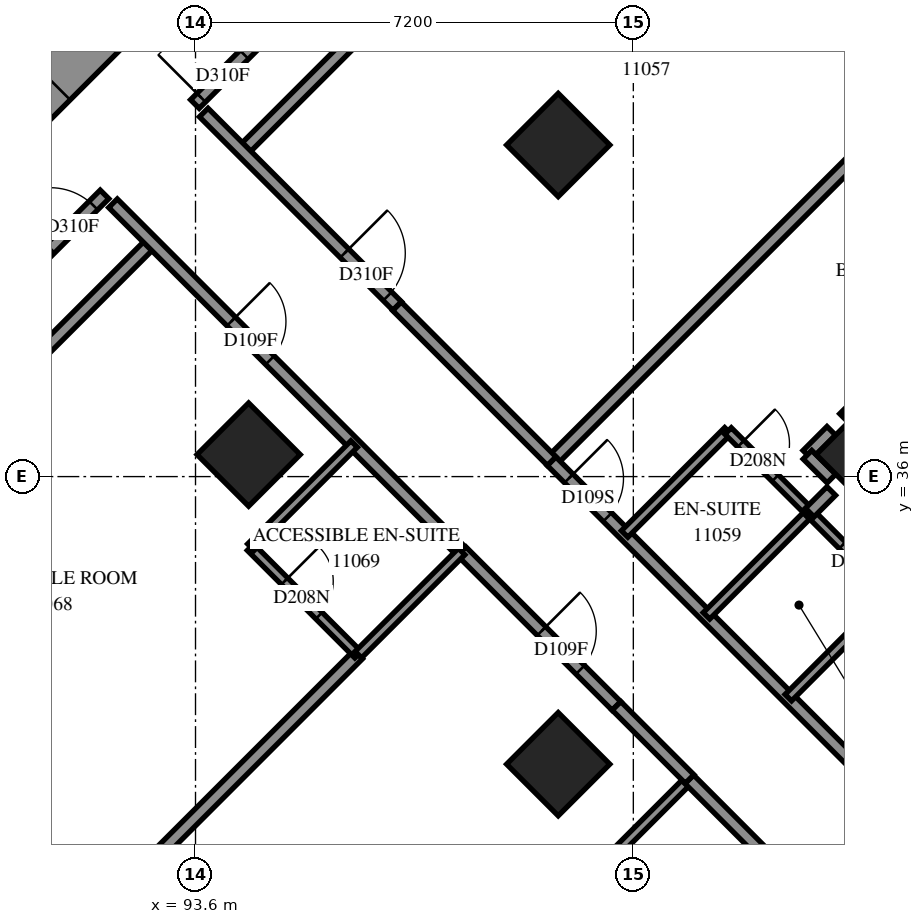
"""IFC4 building model, lengths in metres.
Left out: names, types, materials, properties, quantities, classifications, styles, units other than length and angle.
Written with IfcOpenShell. Run it as: python <this file> out.ifc"""

import sys

from ifc_helpers import new_model, si_unit, direction, frame, frame_2d, origin, origin_2d, place, context, subcontext, project, spatial, polyline, rectangle, outline, extrude, element, fill, save


model = new_model("IFC4")
c1 = context("Model", 3, precision=1e-05, world=origin(), true_north=direction((0.0, 1.0)))
c2 = subcontext(c1, "Body", "Model", "MODEL_VIEW")
j1 = project(units=[si_unit("LENGTHUNIT", "METRE"), si_unit("PLANEANGLEUNIT", "RADIAN")], contexts=[c1])
p1 = place(None, origin())
s1 = spatial("IfcSite", under=j1, at=p1, CompositionType="ELEMENT")
p2 = place(p1, origin())
s2 = spatial("IfcBuilding", under=s1, at=p2, CompositionType="ELEMENT")
p3 = place(p2, frame((0.0, 0.0, 44.0)))
s3 = spatial("IfcBuildingStorey", under=s2, at=p3, CompositionType="ELEMENT", Elevation=44.0)
for number, where, z_axis, x_axis in (
    (1, (99.565, 41.453, 0.0), (0.0, 0.0, 1.0), (0.707, -0.707, 0.0)),
    (2, (94.474, 36.362, 0.0), (0.0, 0.0, 1.0), (0.707, -0.707, 0.0)),
    (3, (104.656, 36.362, 0.0), (0.0, 0.0, 1.0), (0.707, -0.707, 0.0)),
    (4, (99.565, 31.271, 0.0), (0.0, 0.0, 1.0), (0.707, -0.707, 0.0)),
):
    element("IfcColumn", number, at=place(p3, frame(where, z_axis=z_axis, x_axis=x_axis)), inside=s3, PredefinedType="COLUMN", context=c2, shape_type="SweptSolid", body=[
        extrude(rectangle(XDim=1.2, YDim=1.2, at=origin_2d()), origin(), (0.0, 0.0, 1.0), 3.1),
    ])
p4 = place(p3, frame((87.19, 38.554, -0.3), z_axis=(0.0, 0.0, 1.0), x_axis=(0.707103309, 0.7071102534, 0.0)))
e5 = element("IfcWall", 5, at=p4, inside=s3, PredefinedType="SHEAR", context=c2, shape_type="SweptSolid", body=[
    extrude(rectangle(XDim=14.4, YDim=1.0, at=frame_2d((7.2, 0.0))), origin(), (0.0, 0.0, 1.0), 2.7),
])
p5 = place(p4, frame((4.55, 0.0, 0.3)))
e6 = element("IfcOpeningElement", 6, at=p5, cuts=e5, PredefinedType="OPENING", context=c2, shape_type="SweptSolid", body=[
    extrude(rectangle(XDim=1.1, YDim=2.1, at=frame_2d((0.55, 1.05))), frame((0.0, 0.51, 0.0), z_axis=(0.0, -1.0, 0.0), x_axis=(1.0, 0.0, 0.0)), (0.0, 0.0, 1.0), 1.02),
])
p6 = place(p4, frame((11.35, 0.0, 0.3)))
e7 = element("IfcOpeningElement", 7, at=p6, cuts=e5, PredefinedType="OPENING", context=c2, shape_type="SweptSolid", body=[
    extrude(rectangle(XDim=1.1, YDim=2.1, at=frame_2d((0.55, 1.05))), frame((0.0, 0.51, 0.0), z_axis=(0.0, -1.0, 0.0), x_axis=(1.0, 0.0, 0.0)), (0.0, 0.0, 1.0), 1.02),
])
p7 = place(p3, frame((88.097, 30.612, 0.0), z_axis=(0.0, 0.0, 1.0), x_axis=(0.7841326465, -0.6205932587, 0.0)))
e8 = element("IfcWall", 8, at=p7, inside=s3, PredefinedType="SOLIDWALL", context=c2, shape_type="SweptSolid", body=[
    extrude(outline(polyline([(-0.032, -0.275), (3.868, -0.275), (3.932, 0.275), (0.032, 0.275), (-0.032, -0.275)])), origin(), (0.0, 0.0, 1.0), 3.1),
])
p8 = place(p7, frame((0.673, 0.0, 0.5)))
e9 = element("IfcOpeningElement", 9, at=p8, cuts=e8, PredefinedType="OPENING", context=c2, shape_type="SweptSolid", body=[
    extrude(rectangle(XDim=2.8, YDim=2.45, at=frame_2d((1.4, 1.225))), frame((0.0, 0.285, 0.0), z_axis=(0.0, -1.0, 0.0), x_axis=(1.0, 0.0, 0.0)), (0.0, 0.0, 1.0), 0.57),
])
p9 = place(p3, frame((99.459, 36.255, 0.0), z_axis=(0.0, 0.0, 1.0), x_axis=(0.7071903932, 0.7070231593, 0.0)))
e10 = element("IfcWall", 10, at=p9, inside=s3, PredefinedType="PARTITIONING", context=c2, shape_type="SweptSolid", body=[
    extrude(rectangle(XDim=11.959, YDim=0.2, at=frame_2d((5.98, 0.0))), origin(), (0.0, 0.0, 1.0), 3.1),
])
p10 = place(p3, frame((94.367, 41.349, 0.0), z_axis=(0.0, 0.0, 1.0), x_axis=(0.7071109781, 0.7071025843, 0.0)))
e11 = element("IfcWall", 11, at=p10, inside=s3, PredefinedType="PARTITIONING", context=c2, shape_type="SweptSolid", body=[
    extrude(rectangle(XDim=11.914, YDim=0.2, at=frame_2d((5.957, 0.0))), origin(), (0.0, 0.0, 1.0), 3.1),
])
p11 = place(p3, frame((93.59, 42.126, 0.0), z_axis=(0.0, 0.0, 1.0), x_axis=(0.7071067812, 0.7071067812, 0.0)))
e12 = element("IfcWall", 12, at=p11, inside=s3, PredefinedType="PARTITIONING", context=c2, shape_type="SweptSolid", body=[
    extrude(rectangle(XDim=9.849, YDim=0.2, at=frame_2d((4.924, 0.0))), origin(), (0.0, 0.0, 1.0), 3.1),
])
p12 = place(p11, frame((0.148, 0.0, 0.0)))
e13 = element("IfcOpeningElement", 13, at=p12, cuts=e12, PredefinedType="OPENING", context=c2, shape_type="SweptSolid", body=[
    extrude(rectangle(XDim=1.0, YDim=2.1, at=frame_2d((0.5, 1.05))), frame((0.0, 0.11, 0.0), z_axis=(0.0, -1.0, 0.0), x_axis=(1.0, 0.0, 0.0)), (0.0, 0.0, 1.0), 0.22),
])
p13 = place(p3, frame((86.324, 33.296, 0.0), z_axis=(0.0, 0.0, 1.0), x_axis=(0.7069990152, 0.7072145308, 0.0)))
e14 = element("IfcWall", 14, at=p13, inside=s3, PredefinedType="PARTITIONING", context=c2, shape_type="SweptSolid", body=[
    extrude(rectangle(XDim=9.28, YDim=0.2, at=frame_2d((4.64, 0.0))), origin(), (0.0, 0.0, 1.0), 3.1),
])
p14 = place(p3, frame((92.243, 40.495, 0.0), z_axis=(0.0, 0.0, 1.0), x_axis=(0.7071067812, -0.7071067812, 0.0)))
e15 = element("IfcWall", 15, at=p14, inside=s3, PredefinedType="PARTITIONING", context=c2, shape_type="SweptSolid", body=[
    extrude(rectangle(XDim=8.101, YDim=0.2, at=frame_2d((4.05, 0.0))), origin(), (0.0, 0.0, 1.0), 3.1),
])
p15 = place(p14, frame((2.75, 0.0, 0.0)))
e16 = element("IfcOpeningElement", 16, at=p15, cuts=e15, PredefinedType="OPENING", context=c2, shape_type="SweptSolid", body=[
    extrude(rectangle(XDim=0.9, YDim=2.1, at=frame_2d((0.45, 1.05))), frame((0.0, 0.11, 0.0), z_axis=(0.0, -1.0, 0.0), x_axis=(1.0, 0.0, 0.0)), (0.0, 0.0, 1.0), 0.22),
])
p16 = place(p3, frame((86.836, 35.372, 0.0), z_axis=(0.0, 0.0, 1.0), x_axis=(0.7071067812, 0.7071067812, 0.0)))
e17 = element("IfcWall", 17, at=p16, inside=s3, PredefinedType="PARTITIONING", context=c2, shape_type="SweptSolid", body=[
    extrude(rectangle(XDim=7.45, YDim=0.2, at=frame_2d((3.725, 0.0))), origin(), (0.0, 0.0, 1.0), 3.1),
])
p17 = place(p16, frame((6.192, 0.0, 0.0)))
e18 = element("IfcOpeningElement", 18, at=p17, cuts=e17, PredefinedType="OPENING", context=c2, shape_type="SweptSolid", body=[
    extrude(rectangle(XDim=1.0, YDim=2.1, at=frame_2d((0.5, 1.05))), frame((0.0, 0.11, 0.0), z_axis=(0.0, -1.0, 0.0), x_axis=(1.0, 0.0, 0.0)), (0.0, 0.0, 1.0), 0.22),
])
p18 = place(p3, frame((99.455, 36.253, 0.0), z_axis=(0.0, 0.0, 1.0), x_axis=(0.7071067812, -0.7071067812, 0.0)))
e19 = element("IfcWall", 19, at=p18, inside=s3, PredefinedType="PARTITIONING", context=c2, shape_type="SweptSolid", body=[
    extrude(rectangle(XDim=7.201, YDim=0.2, at=frame_2d((3.601, 0.0))), origin(), (0.0, 0.0, 1.0), 3.1),
])
p19 = place(p18, frame((0.401, 0.0, 0.0)))
e20 = element("IfcOpeningElement", 20, at=p19, cuts=e19, PredefinedType="OPENING", context=c2, shape_type="SweptSolid", body=[
    extrude(rectangle(XDim=0.9, YDim=2.1, at=frame_2d((0.45, 1.05))), frame((0.0, 0.11, 0.0), z_axis=(0.0, -1.0, 0.0), x_axis=(1.0, 0.0, 0.0)), (0.0, 0.0, 1.0), 0.22),
])
p20 = place(p3, frame((91.456, 28.255, 0.0), z_axis=(0.0, 0.0, 1.0), x_axis=(0.7071067812, 0.7071067812, 0.0)))
e21 = element("IfcWall", 21, at=p20, inside=s3, PredefinedType="PARTITIONING", context=c2, shape_type="SweptSolid", body=[
    extrude(rectangle(XDim=6.816, YDim=0.2, at=frame_2d((3.408, 0.0))), origin(), (0.0, 0.0, 1.0), 3.1),
])
p21 = place(p3, frame((93.735, 41.987, 0.0), z_axis=(0.0, 0.0, 1.0), x_axis=(0.7071067812, -0.7071067812, 0.0)))
e22 = element("IfcWall", 22, at=p21, inside=s3, PredefinedType="PARTITIONING", context=c2, shape_type="SweptSolid", body=[
    extrude(rectangle(XDim=4.5, YDim=0.2, at=frame_2d((2.25, 0.0))), origin(), (0.0, 0.0, 1.0), 3.1),
])
p22 = place(p21, frame((3.274, 0.0, 0.0)))
e23 = element("IfcOpeningElement", 23, at=p22, cuts=e22, PredefinedType="OPENING", context=c2, shape_type="SweptSolid", body=[
    extrude(rectangle(XDim=1.0, YDim=2.1, at=frame_2d((0.5, 1.05))), frame((0.0, 0.11, 0.0), z_axis=(0.0, -1.0, 0.0), x_axis=(1.0, 0.0, 0.0)), (0.0, 0.0, 1.0), 0.22),
])
p23 = place(p3, frame((96.913, 38.801, 0.0), z_axis=(0.0, 0.0, 1.0), x_axis=(0.7068288851, -0.7073845681, 0.0)))
e24 = element("IfcWall", 24, at=p23, inside=s3, PredefinedType="PARTITIONING", context=c2, shape_type="SweptSolid", body=[
    extrude(rectangle(XDim=3.599, YDim=0.2, at=frame_2d((1.8, 0.0))), origin(), (0.0, 0.0, 1.0), 3.1),
])
p24 = place(p3, frame((97.976, 34.772, 0.0), z_axis=(0.0, 0.0, 1.0), x_axis=(0.7073845681, -0.7068288851, 0.0)))
e25 = element("IfcWall", 25, at=p24, inside=s3, PredefinedType="PARTITIONING", context=c2, shape_type="SweptSolid", body=[
    extrude(rectangle(XDim=3.599, YDim=0.2, at=frame_2d((1.8, 0.0))), origin(), (0.0, 0.0, 1.0), 3.1),
])
p25 = place(p24, frame((1.858, 0.0, 0.0)))
e26 = element("IfcOpeningElement", 26, at=p25, cuts=e25, PredefinedType="OPENING", context=c2, shape_type="SweptSolid", body=[
    extrude(rectangle(XDim=0.9, YDim=2.1, at=frame_2d((0.45, 1.05))), frame((0.0, 0.11, 0.0), z_axis=(0.0, -1.0, 0.0), x_axis=(1.0, 0.0, 0.0)), (0.0, 0.0, 1.0), 0.22),
])
p26 = place(p3, frame((94.505, 34.839, 0.0), z_axis=(0.0, 0.0, 1.0), x_axis=(0.7071067812, -0.7071067812, 0.0)))
e27 = element("IfcWall", 27, at=p26, inside=s3, PredefinedType="PARTITIONING", context=c2, shape_type="SweptSolid", body=[
    extrude(rectangle(XDim=2.5, YDim=0.15, at=frame_2d((1.25, 0.0))), origin(), (0.0, 0.0, 1.0), 3.1),
])
p27 = place(p26, frame((0.792, 0.0, 0.0)))
e28 = element("IfcOpeningElement", 28, at=p27, cuts=e27, PredefinedType="OPENING", context=c2, shape_type="SweptSolid", body=[
    extrude(rectangle(XDim=0.8, YDim=2.1, at=frame_2d((0.4, 1.05))), frame((0.0, 0.085, 0.0), z_axis=(0.0, -1.0, 0.0), x_axis=(1.0, 0.0, 0.0)), (0.0, 0.0, 1.0), 0.17),
])
for number, where, z_axis, x_axis in (
    (29, (102.003, 33.711, 0.0), (0.0, 0.0, 1.0), (0.707, 0.707, 0.0)),
    (30, (100.023, 29.327, 0.0), (0.0, 0.0, 1.0), (0.707, 0.707, 0.0)),
):
    element("IfcWall", number, at=place(p3, frame(where, z_axis=z_axis, x_axis=x_axis)), inside=s3, PredefinedType="PARTITIONING", context=c2, shape_type="SweptSolid", body=[
        extrude(rectangle(XDim=2.401, YDim=0.15, at=frame_2d((1.201, 0.0))), origin(), (0.0, 0.0, 1.0), 3.1),
    ])
for number, where, z_axis, x_axis in (
    (31, (96.278, 33.072, 0.0), (0.0, 0.0, 1.0), (0.708, 0.707, 0.0)),
    (32, (94.511, 34.839, 0.0), (0.0, 0.0, 1.0), (0.708, 0.707, 0.0)),
    (33, (100.657, 35.057, 0.0), (0.0, 0.0, 1.0), (0.708, 0.707, 0.0)),
    (34, (103.349, 32.365, 0.0), (0.0, 0.0, 1.0), (0.707, 0.708, 0.0)),
):
    element("IfcWall", number, at=place(p3, frame(where, z_axis=z_axis, x_axis=x_axis)), inside=s3, PredefinedType="PARTITIONING", context=c2, shape_type="SweptSolid", body=[
        extrude(rectangle(XDim=2.4, YDim=0.15, at=frame_2d((1.2, 0.0))), origin(), (0.0, 0.0, 1.0), 3.1),
    ])
p28 = place(p3, frame((103.701, 35.407, 0.0), z_axis=(0.0, 0.0, 1.0), x_axis=(0.7065800724, -0.7076330979, 0.0)))
e35 = element("IfcWall", 35, at=p28, inside=s3, PredefinedType="PARTITIONING", context=c2, shape_type="SweptSolid", body=[
    extrude(rectangle(XDim=1.899, YDim=0.15, at=frame_2d((0.95, 0.0))), origin(), (0.0, 0.0, 1.0), 3.1),
])
p29 = place(p28, frame((0.759, 0.0, 0.0)))
e36 = element("IfcOpeningElement", 36, at=p29, cuts=e35, PredefinedType="OPENING", context=c2, shape_type="SweptSolid", body=[
    extrude(rectangle(XDim=0.8, YDim=2.1, at=frame_2d((0.4, 1.05))), frame((0.0, 0.085, 0.0), z_axis=(0.0, -1.0, 0.0), x_axis=(1.0, 0.0, 0.0)), (0.0, 0.0, 1.0), 0.17),
])
p30 = place(p3, frame((101.72, 31.022, 0.0), z_axis=(0.0, 0.0, 1.0), x_axis=(0.7065800724, -0.7076330979, 0.0)))
e37 = element("IfcWall", 37, at=p30, inside=s3, PredefinedType="PARTITIONING", context=c2, shape_type="SweptSolid", body=[
    extrude(rectangle(XDim=1.899, YDim=0.2, at=frame_2d((0.95, 0.0))), origin(), (0.0, 0.0, 1.0), 3.1),
])
p31 = place(p3, frame((102.358, 36.75, 0.0), z_axis=(0.0, 0.0, 1.0), x_axis=(0.7076330979, -0.7065800724, 0.0)))
e38 = element("IfcWall", 38, at=p31, inside=s3, PredefinedType="PARTITIONING", context=c2, shape_type="SweptSolid", body=[
    extrude(rectangle(XDim=1.899, YDim=0.15, at=frame_2d((0.95, 0.0))), origin(), (0.0, 0.0, 1.0), 3.1),
])
p32 = place(p31, frame((0.296, 0.0, 0.0)))
e39 = element("IfcOpeningElement", 39, at=p32, cuts=e38, PredefinedType="OPENING", context=c2, shape_type="SweptSolid", body=[
    extrude(rectangle(XDim=0.8, YDim=2.1, at=frame_2d((0.4, 1.05))), frame((0.0, 0.085, 0.0), z_axis=(0.0, -1.0, 0.0), x_axis=(1.0, 0.0, 0.0)), (0.0, 0.0, 1.0), 0.17),
])
p33 = place(p3, frame((100.523, 32.229, 0.0), z_axis=(0.0, 0.0, 1.0), x_axis=(0.7071067812, -0.7071067812, 0.0)))
e40 = element("IfcWall", 40, at=p33, inside=s3, PredefinedType="PARTITIONING", context=c2, shape_type="SweptSolid", body=[
    extrude(rectangle(XDim=1.7, YDim=0.2, at=frame_2d((0.85, 0.0))), origin(), (0.0, 0.0, 1.0), 3.1),
])
for number, where, z_axis, x_axis in (
    (41, (103.661, 36.359, 0.0), (0.0, 0.0, 1.0), (0.707, 0.707, 0.0)),
    (42, (104.265, 36.963, 0.0), (0.0, 0.0, 1.0), (0.707, 0.707, 0.0)),
):
    element("IfcWall", number, at=place(p3, frame(where, z_axis=z_axis, x_axis=x_axis)), inside=s3, PredefinedType="PARTITIONING", context=c2, shape_type="SweptSolid", body=[
        extrude(rectangle(XDim=0.557, YDim=0.2, at=frame_2d((0.279, 0.0))), origin(), (0.0, 0.0, 1.0), 3.1),
    ])
p34 = place(p3, frame((103.664, 36.36, 0.0), z_axis=(0.0, 0.0, 1.0), x_axis=(0.7089037401, -0.705305244, 0.0)))
e43 = element("IfcWall", 43, at=p34, inside=s3, PredefinedType="PARTITIONING", context=c2, shape_type="SweptSolid", body=[
    extrude(rectangle(XDim=0.556, YDim=0.2, at=frame_2d((0.278, 0.0))), origin(), (0.0, 0.0, 1.0), 3.1),
])
p35 = place(p3, frame((103.701, 35.409, 0.0), z_axis=(0.0, 0.0, 1.0), x_axis=(0.7071067812, 0.7071067812, 0.0)))
e44 = element("IfcWall", 44, at=p35, inside=s3, PredefinedType="PARTITIONING", context=c2, shape_type="SweptSolid", body=[
    extrude(rectangle(XDim=0.501, YDim=0.2, at=frame_2d((0.25, 0.0))), origin(), (0.0, 0.0, 1.0), 3.1),
])
p36 = place(p12, origin())
e45 = element("IfcDoor", 45, at=p36, inside=s3, OperationType="SINGLE_SWING_LEFT", PredefinedType="DOOR", context=c2, shape_type="SweptSolid", body=[
    extrude(rectangle(XDim=1.0, YDim=2.1, at=frame_2d((0.5, 1.05))), frame((0.0, 0.025, 0.0), z_axis=(0.0, -1.0, 0.0), x_axis=(1.0, 0.0, 0.0)), (0.0, 0.0, 1.0), 0.05),
])
fill(e13, e45)
p37 = place(p22, origin())
e46 = element("IfcDoor", 46, at=p37, inside=s3, OperationType="SINGLE_SWING_RIGHT", PredefinedType="DOOR", context=c2, shape_type="SweptSolid", body=[
    extrude(rectangle(XDim=1.0, YDim=2.1, at=frame_2d((0.5, 1.05))), frame((0.0, 0.025, 0.0), z_axis=(0.0, -1.0, 0.0), x_axis=(1.0, 0.0, 0.0)), (0.0, 0.0, 1.0), 0.05),
])
fill(e23, e46)
p38 = place(p19, origin())
e47 = element("IfcDoor", 47, at=p38, inside=s3, OperationType="SINGLE_SWING_RIGHT", PredefinedType="DOOR", context=c2, shape_type="SweptSolid", body=[
    extrude(rectangle(XDim=0.9, YDim=2.1, at=frame_2d((0.45, 1.05))), frame((0.0, 0.025, 0.0), z_axis=(0.0, -1.0, 0.0), x_axis=(1.0, 0.0, 0.0)), (0.0, 0.0, 1.0), 0.05),
])
fill(e20, e47)
p39 = place(p32, origin())
e48 = element("IfcDoor", 48, at=p39, inside=s3, OperationType="SINGLE_SWING_RIGHT", PredefinedType="DOOR", context=c2, shape_type="SweptSolid", body=[
    extrude(rectangle(XDim=0.8, YDim=2.1, at=frame_2d((0.4, 1.05))), frame((0.0, 0.025, 0.0), z_axis=(0.0, -1.0, 0.0), x_axis=(1.0, 0.0, 0.0)), (0.0, 0.0, 1.0), 0.05),
])
fill(e39, e48)
p40 = place(p29, origin())
e49 = element("IfcDoor", 49, at=p40, inside=s3, OperationType="SINGLE_SWING_RIGHT", PredefinedType="DOOR", context=c2, shape_type="SweptSolid", body=[
    extrude(rectangle(XDim=0.8, YDim=2.1, at=frame_2d((0.4, 1.05))), frame((0.0, 0.025, 0.0), z_axis=(0.0, -1.0, 0.0), x_axis=(1.0, 0.0, 0.0)), (0.0, 0.0, 1.0), 0.05),
])
fill(e36, e49)
p41 = place(p17, origin())
e50 = element("IfcDoor", 50, at=p41, inside=s3, OperationType="SINGLE_SWING_RIGHT", PredefinedType="DOOR", context=c2, shape_type="SweptSolid", body=[
    extrude(rectangle(XDim=1.0, YDim=2.1, at=frame_2d((0.5, 1.05))), frame((0.0, 0.025, 0.0), z_axis=(0.0, -1.0, 0.0), x_axis=(1.0, 0.0, 0.0)), (0.0, 0.0, 1.0), 0.05),
])
fill(e18, e50)
p42 = place(p15, origin())
e51 = element("IfcDoor", 51, at=p42, inside=s3, OperationType="SINGLE_SWING_LEFT", PredefinedType="DOOR", context=c2, shape_type="SweptSolid", body=[
    extrude(rectangle(XDim=0.9, YDim=2.1, at=frame_2d((0.45, 1.05))), frame((0.0, 0.025, 0.0), z_axis=(0.0, -1.0, 0.0), x_axis=(1.0, 0.0, 0.0)), (0.0, 0.0, 1.0), 0.05),
])
fill(e16, e51)
p43 = place(p27, origin())
e52 = element("IfcDoor", 52, at=p43, inside=s3, OperationType="SINGLE_SWING_RIGHT", PredefinedType="DOOR", context=c2, shape_type="SweptSolid", body=[
    extrude(rectangle(XDim=0.8, YDim=2.1, at=frame_2d((0.4, 1.05))), frame((0.0, 0.025, 0.0), z_axis=(0.0, -1.0, 0.0), x_axis=(1.0, 0.0, 0.0)), (0.0, 0.0, 1.0), 0.05),
])
fill(e28, e52)
p44 = place(p25, origin())
e53 = element("IfcDoor", 53, at=p44, inside=s3, OperationType="SINGLE_SWING_LEFT", PredefinedType="DOOR", context=c2, shape_type="SweptSolid", body=[
    extrude(rectangle(XDim=0.9, YDim=2.1, at=frame_2d((0.45, 1.05))), frame((0.0, 0.025, 0.0), z_axis=(0.0, -1.0, 0.0), x_axis=(1.0, 0.0, 0.0)), (0.0, 0.0, 1.0), 0.05),
])
fill(e26, e53)
save(model, sys.argv[1])
